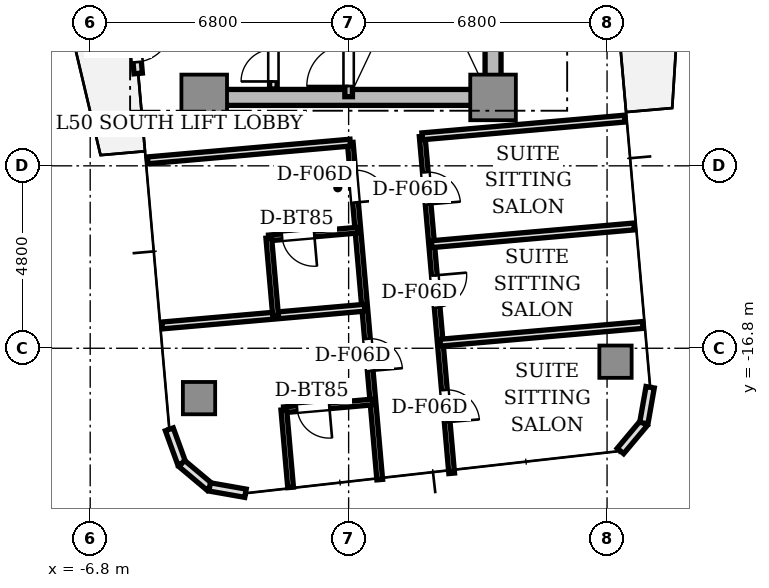
"""IFC4 building model, lengths in metres.
Left out: names, types, materials, properties, quantities, classifications, styles, units other than length and angle.
Written with IfcOpenShell. Run it as: python <this file> out.ifc"""

import sys

from ifc_helpers import new_model, si_unit, direction, frame, frame_2d, origin, origin_2d, place, context, subcontext, project, spatial, rectangle, extrude, source, transform, mapped, element, fill, save


model = new_model("IFC4")
c1 = context("Model", 3, precision=1e-05, world=origin(), true_north=direction((0.0, 1.0)))
c2 = subcontext(c1, "Body", "Model", "MODEL_VIEW")
j1 = project(units=[si_unit("LENGTHUNIT", "METRE"), si_unit("PLANEANGLEUNIT", "RADIAN")], contexts=[c1])
p1 = place(None, origin())
s1 = spatial("IfcSite", under=j1, at=p1, CompositionType="ELEMENT")
p2 = place(p1, origin())
s2 = spatial("IfcBuilding", under=s1, at=p2, CompositionType="ELEMENT")
p3 = place(p2, frame((0.0, 0.0, 181.9)))
s3 = spatial("IfcBuildingStorey", under=s2, at=p3, CompositionType="ELEMENT", Elevation=181.9)
p4 = place(p3, frame((-3.55, -10.2, 0.0), z_axis=(0.0, 0.0, 1.0), x_axis=(1.0, 0.0, 0.0)))
e1 = element("IfcWall", 1, at=p4, inside=s3, PredefinedType="SHEAR", context=c2, shape_type="SweptSolid", body=[
    extrude(rectangle(XDim=7.1, YDim=0.42, at=frame_2d((3.55, 0.0))), origin(), (0.0, 0.0, 1.0), 3.11),
])
p5 = place(p3, frame((3.8, -9.75, 0.0), z_axis=(0.0, 0.0, 1.0), x_axis=(0.0, 1.0, 0.0)))
e2 = element("IfcWall", 2, at=p5, inside=s3, PredefinedType="SHEAR", context=c2, shape_type="SweptSolid", body=[
    extrude(rectangle(XDim=6.9, YDim=0.42, at=frame_2d((3.45, 0.0))), origin(), (0.0, 0.0, 1.0), 3.11),
])
m1 = source(origin(), c2, "Body", "SweptSolid", [
    extrude(rectangle(XDim=1.2, YDim=1.2, at=origin_2d()), origin(), (0.0, 0.0, 1.0), 3.11),
])
for number, where, z_axis, x_axis in (
    (3, (-3.8, -10.2, 0.0), (0.0, 0.0, 1.0), (1.0, 0.0, 0.0)),
    (4, (3.8, -10.2, 0.0), (0.0, 0.0, 1.0), (1.0, 0.0, 0.0)),
):
    element("IfcColumn", number, at=place(p3, frame(where, z_axis=z_axis, x_axis=x_axis)), inside=s3, PredefinedType="COLUMN", context=c2, shape_type="MappedRepresentation", body=[
        mapped(m1, transform((0.0, 0.0, 0.0), scale=1.0)),
    ])
m2 = source(origin(), c2, "Body", "SweptSolid", [
    extrude(rectangle(XDim=0.85, YDim=0.85, at=origin_2d()), origin(), (0.0, 0.0, 1.0), 3.11),
])
for number, where, z_axis, x_axis in (
    (5, (-3.936, -18.112, 0.0), (0.0, 0.0, 1.0), (1.0, 0.0, 0.0)),
    (6, (7.022, -17.153, 0.0), (0.0, 0.0, 1.0), (1.0, 0.0, 0.0)),
):
    element("IfcColumn", number, at=place(p3, frame(where, z_axis=z_axis, x_axis=x_axis)), inside=s3, PredefinedType="COLUMN", context=c2, shape_type="MappedRepresentation", body=[
        mapped(m2, transform((0.0, 0.0, 0.0), scale=1.0)),
    ])
p6 = place(p3, frame((-5.772, -6.879, 0.0), z_axis=(0.0, 0.0, 1.0), x_axis=(0.087168071984, -0.996193619346, 0.0)))
e7 = element("IfcWall", 7, at=p6, inside=s3, PredefinedType="STANDARD", context=c2, shape_type="SweptSolid", body=[
    extrude(rectangle(XDim=2.7, YDim=0.22, at=frame_2d((1.35, 0.0))), origin(), (0.0, 0.0, 1.0), 3.11),
])
p7 = place(p6, frame((1.4, 0.0, 0.0)))
e8 = element("IfcOpeningElement", 8, at=p7, cuts=e7, PredefinedType="OPENING", context=c2, shape_type="SweptSolid", body=[
    extrude(rectangle(XDim=1.0, YDim=2.2, at=frame_2d((0.5, 1.1))), frame((0.0, 0.12, 0.0), z_axis=(0.0, -1.0, 0.0), x_axis=(1.0, 0.0, 0.0)), (0.0, 0.0, 1.0), 0.24),
])
p8 = place(p3, frame((-4.718, -18.933, 0.0), z_axis=(0.0, 0.0, 1.0), x_axis=(0.34188635151, -0.939741306239, 0.0)))
e9 = element("IfcWall", 9, at=p8, inside=s3, PredefinedType="STANDARD", context=c2, shape_type="SweptSolid", body=[
    extrude(rectangle(XDim=0.958, YDim=0.22, at=frame_2d((0.479, 0.0))), origin(), (0.0, 0.0, 1.0), 3.11),
])
for number, where, z_axis, x_axis in (
    (10, (-4.39, -19.833, 0.0), (0.0, 0.0, 1.0), (0.766, -0.643, 0.0)),
    (11, (-3.657, -20.449, 0.0), (0.0, 0.0, 1.0), (0.985, -0.174, 0.0)),
):
    element("IfcWall", number, at=place(p3, frame(where, z_axis=z_axis, x_axis=x_axis)), inside=s3, PredefinedType="STANDARD", context=c2, shape_type="SweptSolid", body=[
        extrude(rectangle(XDim=0.958, YDim=0.22, at=frame_2d((0.479, 0.0))), origin(), (0.0, 0.0, 1.0), 3.11),
    ])
for number, where, z_axis, x_axis in (
    (12, (7.152, -19.503, 0.0), (0.0, 0.0, 1.0), (0.643, 0.766, 0.0)),
    (13, (7.768, -18.769, 0.0), (0.0, 0.0, 1.0), (0.174, 0.985, 0.0)),
):
    element("IfcWall", number, at=place(p3, frame(where, z_axis=z_axis, x_axis=x_axis)), inside=s3, PredefinedType="STANDARD", context=c2, shape_type="SweptSolid", body=[
        extrude(rectangle(XDim=0.958, YDim=0.22, at=frame_2d((0.479, 0.0))), origin(), (0.0, 0.0, 1.0), 3.11),
    ])
p9 = place(p3, frame((0.0, -10.18, 0.0), z_axis=(0.0, 0.0, 1.0), x_axis=(0.0, 1.0, 0.0)))
e14 = element("IfcWall", 14, at=p9, inside=s3, PredefinedType="SOLIDWALL", context=c2, shape_type="SweptSolid", body=[
    extrude(rectangle(XDim=7.68, YDim=0.2, at=frame_2d((3.84, 0.0))), origin(), (0.0, 0.0, 1.0), 3.11),
])
p10 = place(p9, frame((0.28, 0.0, 0.0)))
e15 = element("IfcOpeningElement", 15, at=p10, cuts=e14, PredefinedType="OPENING", context=c2, shape_type="SweptSolid", body=[
    extrude(rectangle(XDim=1.1, YDim=2.15, at=frame_2d((0.55, 1.075))), frame((0.0, 0.11, 0.0), z_axis=(0.0, -1.0, 0.0), x_axis=(1.0, 0.0, 0.0)), (0.0, 0.0, 1.0), 0.22),
])
p11 = place(p3, frame((-1.98, -9.98, 0.0), z_axis=(0.0, 0.0, 1.0), x_axis=(0.0, 1.0, 0.0)))
e16 = element("IfcWall", 16, at=p11, inside=s3, PredefinedType="SOLIDWALL", context=c2, shape_type="SweptSolid", body=[
    extrude(rectangle(XDim=4.66, YDim=0.2, at=frame_2d((2.33, 0.0))), origin(), (0.0, 0.0, 1.0), 2.66),
])
p12 = place(p11, frame((0.2, 0.0, 0.0)))
e17 = element("IfcOpeningElement", 17, at=p12, cuts=e16, PredefinedType="OPENING", context=c2, shape_type="SweptSolid", body=[
    extrude(rectangle(XDim=0.85, YDim=2.1, at=frame_2d((0.425, 1.05))), frame((0.0, 0.11, 0.0), z_axis=(0.0, -1.0, 0.0), x_axis=(1.0, 0.0, 0.0)), (0.0, 0.0, 1.0), 0.22),
])
p13 = place(p3, frame((1.936, -11.224, 0.0), z_axis=(0.0, 0.0, 1.0), x_axis=(0.087151636982, -0.996195057291, 0.0)))
e18 = element("IfcWall", 18, at=p13, inside=s3, PredefinedType="PARTITIONING", context=c2, shape_type="SweptSolid", body=[
    extrude(rectangle(XDim=8.9, YDim=0.15, at=frame_2d((4.45, 0.0))), origin(), (0.0, 0.0, 1.0), 2.66),
])
p14 = place(p13, frame((0.949, 0.0, 0.0)))
e19 = element("IfcOpeningElement", 19, at=p14, cuts=e18, PredefinedType="OPENING", context=c2, shape_type="SweptSolid", body=[
    extrude(rectangle(XDim=0.85, YDim=2.1, at=frame_2d((0.425, 1.05))), frame((0.0, 0.085, 0.0), z_axis=(0.0, -1.0, 0.0), x_axis=(1.0, 0.0, 0.0)), (0.0, 0.0, 1.0), 0.17),
])
p15 = place(p13, frame((3.674, 0.0, 0.0)))
e20 = element("IfcOpeningElement", 20, at=p15, cuts=e18, PredefinedType="OPENING", context=c2, shape_type="SweptSolid", body=[
    extrude(rectangle(XDim=0.85, YDim=2.1, at=frame_2d((0.425, 1.05))), frame((0.0, 0.085, 0.0), z_axis=(0.0, -1.0, 0.0), x_axis=(1.0, 0.0, 0.0)), (0.0, 0.0, 1.0), 0.17),
])
p16 = place(p13, frame((6.7, 0.0, 0.0)))
e21 = element("IfcOpeningElement", 21, at=p16, cuts=e18, PredefinedType="OPENING", context=c2, shape_type="SweptSolid", body=[
    extrude(rectangle(XDim=0.85, YDim=2.1, at=frame_2d((0.425, 1.05))), frame((0.0, 0.085, 0.0), z_axis=(0.0, -1.0, 0.0), x_axis=(1.0, 0.0, 0.0)), (0.0, 0.0, 1.0), 0.17),
])
p17 = place(p3, frame((0.043, -11.39, 0.0), z_axis=(0.0, 0.0, 1.0), x_axis=(0.087178860582, -0.996192675273, 0.0)))
e22 = element("IfcWall", 22, at=p17, inside=s3, PredefinedType="PARTITIONING", context=c2, shape_type="SweptSolid", body=[
    extrude(rectangle(XDim=8.9, YDim=0.15, at=frame_2d((4.45, 0.0))), origin(), (0.0, 0.0, 1.0), 2.66),
])
p18 = place(p17, frame((0.73, 0.0, 0.0)))
e23 = element("IfcOpeningElement", 23, at=p18, cuts=e22, PredefinedType="OPENING", context=c2, shape_type="SweptSolid", body=[
    extrude(rectangle(XDim=0.85, YDim=2.1, at=frame_2d((0.425, 1.05))), frame((0.0, 0.085, 0.0), z_axis=(0.0, -1.0, 0.0), x_axis=(1.0, 0.0, 0.0)), (0.0, 0.0, 1.0), 0.17),
])
p19 = place(p17, frame((5.181, 0.0, 0.0)))
e24 = element("IfcOpeningElement", 24, at=p19, cuts=e22, PredefinedType="OPENING", context=c2, shape_type="SweptSolid", body=[
    extrude(rectangle(XDim=0.85, YDim=2.1, at=frame_2d((0.425, 1.05))), frame((0.0, 0.085, 0.0), z_axis=(0.0, -1.0, 0.0), x_axis=(1.0, 0.0, 0.0)), (0.0, 0.0, 1.0), 0.17),
])
for number, where, z_axis, x_axis in (
    (25, (1.936, -11.224, 0.0), (0.0, 0.0, 1.0), (0.996, 0.087, 0.0)),
    (26, (-5.287, -11.856, 0.0), (0.0, 0.0, 1.0), (0.996, 0.087, 0.0)),
    (27, (2.184, -14.061, 0.0), (0.0, 0.0, 1.0), (0.996, 0.087, 0.0)),
    (28, (2.411, -16.653, 0.0), (0.0, 0.0, 1.0), (0.996, 0.087, 0.0)),
    (29, (0.423, -15.734, 0.0), (0.0, 0.0, 1.0), (-0.996, -0.087, 0.0)),
):
    element("IfcWall", number, at=place(p3, frame(where, z_axis=z_axis, x_axis=x_axis)), inside=s3, PredefinedType="PARTITIONING", context=c2, shape_type="SweptSolid", body=[
        extrude(rectangle(XDim=5.35, YDim=0.18, at=frame_2d((2.675, 0.0))), origin(), (0.0, 0.0, 1.0), 2.66),
    ])
p20 = place(p3, frame((0.244, -13.692, 0.0), z_axis=(0.0, 0.0, 1.0), x_axis=(-0.996197656711, -0.087121918963, 0.0)))
e30 = element("IfcWall", 30, at=p20, inside=s3, PredefinedType="PARTITIONING", context=c2, shape_type="SweptSolid", body=[
    extrude(rectangle(XDim=2.354, YDim=0.15, at=frame_2d((1.177, 0.0))), origin(), (0.0, 0.0, 1.0), 2.66),
])
p21 = place(p20, frame((1.154, 0.0, 0.0)))
e31 = element("IfcOpeningElement", 31, at=p21, cuts=e30, PredefinedType="OPENING", context=c2, shape_type="SweptSolid", body=[
    extrude(rectangle(XDim=0.85, YDim=2.1, at=frame_2d((0.425, 1.05))), frame((0.0, 0.085, 0.0), z_axis=(0.0, -1.0, 0.0), x_axis=(1.0, 0.0, 0.0)), (0.0, 0.0, 1.0), 0.17),
])
p22 = place(p3, frame((-2.101, -13.897, 0.0), z_axis=(0.0, 0.0, 1.0), x_axis=(0.087174336889, -0.99619307114, 0.0)))
e32 = element("IfcWall", 32, at=p22, inside=s3, PredefinedType="PARTITIONING", context=c2, shape_type="SweptSolid", body=[
    extrude(rectangle(XDim=2.05, YDim=0.15, at=frame_2d((1.025, 0.0))), origin(), (0.0, 0.0, 1.0), 2.66),
])
p23 = place(p3, frame((0.64, -18.213, 0.0), z_axis=(0.0, 0.0, 1.0), x_axis=(-0.996188649846, -0.087224846905, 0.0)))
e33 = element("IfcWall", 33, at=p23, inside=s3, PredefinedType="PARTITIONING", context=c2, shape_type="SweptSolid", body=[
    extrude(rectangle(XDim=2.354, YDim=0.15, at=frame_2d((1.177, 0.0))), origin(), (0.0, 0.0, 1.0), 2.66),
])
p24 = place(p23, frame((1.154, 0.0, 0.0)))
e34 = element("IfcOpeningElement", 34, at=p24, cuts=e33, PredefinedType="OPENING", context=c2, shape_type="SweptSolid", body=[
    extrude(rectangle(XDim=0.85, YDim=2.1, at=frame_2d((0.425, 1.05))), frame((0.0, 0.085, 0.0), z_axis=(0.0, -1.0, 0.0), x_axis=(1.0, 0.0, 0.0)), (0.0, 0.0, 1.0), 0.17),
])
p25 = place(p3, frame((-1.705, -18.419, 0.0), z_axis=(0.0, 0.0, 1.0), x_axis=(0.087056149438, -0.996203406361, 0.0)))
e35 = element("IfcWall", 35, at=p25, inside=s3, PredefinedType="PARTITIONING", context=c2, shape_type="SweptSolid", body=[
    extrude(rectangle(XDim=2.05, YDim=0.15, at=frame_2d((1.025, 0.0))), origin(), (0.0, 0.0, 1.0), 2.66),
])
m3 = source(origin(), c2, "Body", "SweptSolid", [
    extrude(rectangle(XDim=1.0, YDim=0.05, at=origin_2d()), origin(), (0.0, 0.0, 1.0), 2.2),
])
p26 = place(p7, frame((0.5, 0.0, 0.0)))
e36 = element("IfcDoor", 36, at=p26, inside=s3, OperationType="SINGLE_SWING_LEFT", PredefinedType="DOOR", context=c2, shape_type="MappedRepresentation", body=[
    mapped(m3, transform((0.0, 0.0, 0.0), scale=1.0)),
])
fill(e8, e36)
m4 = source(origin(), c2, "Body", "SweptSolid", [
    extrude(rectangle(XDim=1.1, YDim=0.05, at=origin_2d()), origin(), (0.0, 0.0, 1.0), 2.15),
])
p27 = place(p10, frame((0.55, 0.0, 0.0)))
e37 = element("IfcDoor", 37, at=p27, inside=s3, OperationType="SINGLE_SWING_LEFT", PredefinedType="DOOR", context=c2, shape_type="MappedRepresentation", body=[
    mapped(m4, transform((0.0, 0.0, 0.0), scale=1.0)),
])
fill(e15, e37)
m5 = source(origin(), c2, "Body", "SweptSolid", [
    extrude(rectangle(XDim=0.85, YDim=0.05, at=origin_2d()), origin(), (0.0, 0.0, 1.0), 2.1),
])
p28 = place(p12, frame((0.425, 0.0, 0.0)))
e38 = element("IfcDoor", 38, at=p28, inside=s3, OperationType="SINGLE_SWING_LEFT", PredefinedType="DOOR", context=c2, shape_type="MappedRepresentation", body=[
    mapped(m5, transform((0.0, 0.0, 0.0), scale=1.0)),
])
fill(e17, e38)
p29 = place(p14, frame((0.425, 0.0, 0.0)))
e39 = element("IfcDoor", 39, at=p29, inside=s3, OperationType="SINGLE_SWING_RIGHT", PredefinedType="DOOR", context=c2, shape_type="MappedRepresentation", body=[
    mapped(m5, transform((0.0, 0.0, 0.0), scale=1.0)),
])
fill(e19, e39)
p30 = place(p15, frame((0.425, 0.0, 0.0)))
e40 = element("IfcDoor", 40, at=p30, inside=s3, OperationType="SINGLE_SWING_LEFT", PredefinedType="DOOR", context=c2, shape_type="MappedRepresentation", body=[
    mapped(m5, transform((0.0, 0.0, 0.0), scale=1.0)),
])
fill(e20, e40)
p31 = place(p16, frame((0.425, 0.0, 0.0)))
e41 = element("IfcDoor", 41, at=p31, inside=s3, OperationType="SINGLE_SWING_RIGHT", PredefinedType="DOOR", context=c2, shape_type="MappedRepresentation", body=[
    mapped(m5, transform((0.0, 0.0, 0.0), scale=1.0)),
])
fill(e21, e41)
p32 = place(p21, frame((0.425, 0.0, 0.0)))
e42 = element("IfcDoor", 42, at=p32, inside=s3, OperationType="SINGLE_SWING_LEFT", PredefinedType="DOOR", context=c2, shape_type="MappedRepresentation", body=[
    mapped(m5, transform((0.0, 0.0, 0.0), scale=1.0)),
])
fill(e31, e42)
p33 = place(p18, frame((0.425, 0.0, 0.0)))
e43 = element("IfcDoor", 43, at=p33, inside=s3, OperationType="SINGLE_SWING_RIGHT", PredefinedType="DOOR", context=c2, shape_type="MappedRepresentation", body=[
    mapped(m5, transform((0.0, 0.0, 0.0), scale=1.0)),
])
fill(e23, e43)
p34 = place(p24, frame((0.425, 0.0, 0.0)))
e44 = element("IfcDoor", 44, at=p34, inside=s3, OperationType="SINGLE_SWING_LEFT", PredefinedType="DOOR", context=c2, shape_type="MappedRepresentation", body=[
    mapped(m5, transform((0.0, 0.0, 0.0), scale=1.0)),
])
fill(e34, e44)
p35 = place(p19, frame((0.425, 0.0, 0.0)))
e45 = element("IfcDoor", 45, at=p35, inside=s3, OperationType="SINGLE_SWING_RIGHT", PredefinedType="DOOR", context=c2, shape_type="MappedRepresentation", body=[
    mapped(m5, transform((0.0, 0.0, 0.0), scale=1.0)),
])
fill(e24, e45)
save(model, sys.argv[1])
